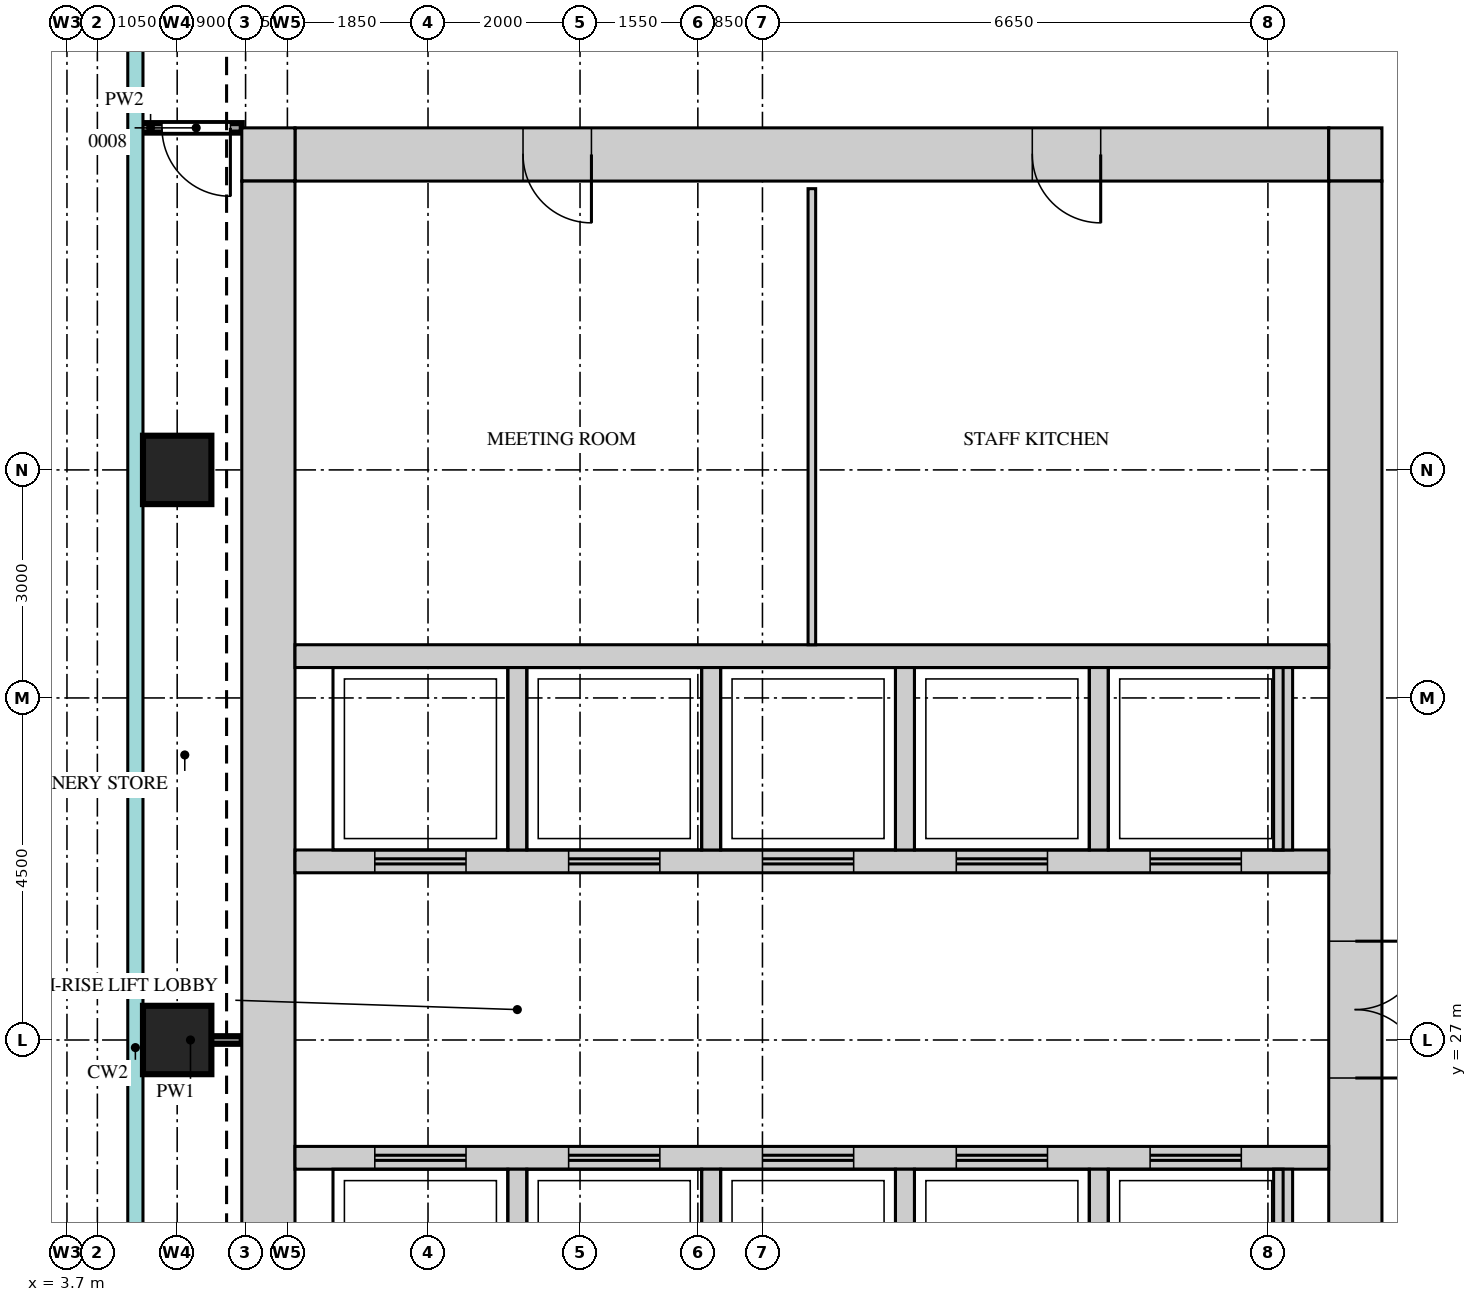
"""IFC4 building model, lengths in metres.
Left out: names, types, materials, properties, quantities, classifications, styles, units other than length and angle.
Written with IfcOpenShell. Run it as: python <this file> out.ifc"""

import sys

from ifc_helpers import new_model, si_unit, direction, frame, frame_2d, origin, origin_2d, place, context, subcontext, project, spatial, rectangle, extrude, source, transform, mapped, element, fill, save


model = new_model("IFC4")
c1 = context("Model", 3, precision=1e-05, world=origin(), true_north=direction((0.0, 1.0)))
c2 = subcontext(c1, "Body", "Model", "MODEL_VIEW")
j1 = project(units=[si_unit("LENGTHUNIT", "METRE"), si_unit("PLANEANGLEUNIT", "RADIAN")], contexts=[c1])
p1 = place(None, origin())
s1 = spatial("IfcSite", under=j1, at=p1, CompositionType="ELEMENT")
p2 = place(p1, origin())
s2 = spatial("IfcBuilding", under=s1, at=p2, CompositionType="ELEMENT")
p3 = place(p2, frame((0.0, 0.0, 230.2)))
s3 = spatial("IfcBuildingStorey", under=s2, at=p3, CompositionType="ELEMENT", Elevation=230.2)
m1 = source(origin(), c2, "Body", "SweptSolid", [
    extrude(rectangle(XDim=13.6, YDim=0.7, at=frame_2d((6.8, 0.0))), origin(), (0.0, 0.0, 1.0), 3.75),
])
p4 = place(p3, frame((6.7, 38.65, 0.0), z_axis=(0.0, 0.0, 1.0), x_axis=(1.0, 0.0, 0.0)))
e1 = element("IfcWall", 1, at=p4, inside=s3, PredefinedType="SHEAR", context=c2, shape_type="MappedRepresentation", body=[
    mapped(m1, transform((0.0, 0.0, 0.0))),
])
m2 = source(origin(), c2, "Body", "SweptSolid", [
    extrude(rectangle(XDim=0.9, YDim=2.1, at=frame_2d((0.45, 1.05))), frame((0.0, 0.36, 0.0), z_axis=(0.0, -1.0, 0.0), x_axis=(1.0, 0.0, 0.0)), (0.0, 0.0, 1.0), 0.72),
])
p5 = place(p4, frame((3.0, 0.0, 0.0)))
e2 = element("IfcOpeningElement", 2, at=p5, cuts=e1, PredefinedType="OPENING", context=c2, shape_type="MappedRepresentation", body=[
    mapped(m2, transform((0.0, 0.0, 0.0))),
])
p6 = place(p4, frame((9.7, 0.0, 0.0)))
e3 = element("IfcOpeningElement", 3, at=p6, cuts=e1, PredefinedType="OPENING", context=c2, shape_type="MappedRepresentation", body=[
    mapped(m2, transform((0.0, 0.0, 0.0))),
])
m3 = source(origin(), c2, "Body", "SweptSolid", [
    extrude(rectangle(XDim=0.7, YDim=0.7, at=frame_2d((0.35, 0.0))), origin(), (0.0, 0.0, 1.0), 3.75),
])
for number, where, z_axis, x_axis in (
    (4, (20.3, 38.65, 0.0), (0.0, 0.0, 1.0), (1.0, 0.0, 0.0)),
    (5, (6.0, 38.65, 0.0), (0.0, 0.0, 1.0), (1.0, 0.0, 0.0)),
):
    element("IfcWall", number, at=place(p3, frame(where, z_axis=z_axis, x_axis=x_axis)), inside=s3, PredefinedType="SHEAR", context=c2, shape_type="MappedRepresentation", body=[
        mapped(m3, transform((0.0, 0.0, 0.0))),
    ])
m4 = source(origin(), c2, "Body", "SweptSolid", [
    extrude(rectangle(XDim=22.6, YDim=0.7, at=frame_2d((11.3, 0.0))), origin(), (0.0, 0.0, 1.0), 3.75),
])
p7 = place(p3, frame((20.65, 15.7, 0.0), z_axis=(0.0, 0.0, 1.0), x_axis=(0.0, 1.0, 0.0)))
e6 = element("IfcWall", 6, at=p7, inside=s3, PredefinedType="SHEAR", context=c2, shape_type="MappedRepresentation", body=[
    mapped(m4, transform((0.0, 0.0, 0.0))),
])
m5 = source(origin(), c2, "Body", "SweptSolid", [
    extrude(rectangle(XDim=1.8, YDim=2.1, at=frame_2d((0.9, 1.05))), frame((0.0, 0.36, 0.0), z_axis=(0.0, -1.0, 0.0), x_axis=(1.0, 0.0, 0.0)), (0.0, 0.0, 1.0), 0.72),
])
p8 = place(p7, frame((10.8, 0.0, 0.0)))
e7 = element("IfcOpeningElement", 7, at=p8, cuts=e6, PredefinedType="OPENING", context=c2, shape_type="MappedRepresentation", body=[
    mapped(m5, transform((0.0, 0.0, 0.0))),
])
p9 = place(p7, frame((0.45, 0.0, 0.0)))
e8 = element("IfcOpeningElement", 8, at=p9, cuts=e6, PredefinedType="OPENING", context=c2, shape_type="MappedRepresentation", body=[
    mapped(m2, transform((0.0, 0.0, 0.0))),
])
p10 = place(p7, frame((2.9, 0.0, 0.0)))
e9 = element("IfcOpeningElement", 9, at=p10, cuts=e6, PredefinedType="OPENING", context=c2, shape_type="MappedRepresentation", body=[
    mapped(m2, transform((0.0, 0.0, 0.0))),
])
p11 = place(p7, frame((5.65, 0.0, 0.0)))
e10 = element("IfcOpeningElement", 10, at=p11, cuts=e6, PredefinedType="OPENING", context=c2, shape_type="MappedRepresentation", body=[
    mapped(m2, transform((0.0, 0.0, 0.0))),
])
p12 = place(p3, frame((6.35, 15.7, 0.0), z_axis=(0.0, 0.0, 1.0), x_axis=(0.0, 1.0, 0.0)))
e11 = element("IfcWall", 11, at=p12, inside=s3, PredefinedType="SHEAR", context=c2, shape_type="MappedRepresentation", body=[
    mapped(m4, transform((0.0, 0.0, 0.0))),
])
m6 = source(origin(), c2, "Body", "SweptSolid", [
    extrude(rectangle(XDim=13.6, YDim=0.3, at=frame_2d((6.8, 0.0))), origin(), (0.0, 0.0, 1.0), 3.75),
])
p13 = place(p3, frame((6.7, 32.05, 0.0), z_axis=(0.0, 0.0, 1.0), x_axis=(1.0, 0.0, 0.0)))
e12 = element("IfcWall", 12, at=p13, inside=s3, PredefinedType="STANDARD", context=c2, shape_type="MappedRepresentation", body=[
    mapped(m6, transform((0.0, 0.0, 0.0))),
])
p14 = place(p3, frame((6.7, 29.35, 0.0), z_axis=(0.0, 0.0, 1.0), x_axis=(1.0, 0.0, 0.0)))
e13 = element("IfcWall", 13, at=p14, inside=s3, PredefinedType="STANDARD", context=c2, shape_type="MappedRepresentation", body=[
    mapped(m6, transform((0.0, 0.0, 0.0))),
])
m7 = source(origin(), c2, "Body", "SweptSolid", [
    extrude(rectangle(XDim=1.2, YDim=2.1, at=frame_2d((0.6, 1.05))), frame((0.0, 0.16, 0.0), z_axis=(0.0, -1.0, 0.0), x_axis=(1.0, 0.0, 0.0)), (0.0, 0.0, 1.0), 0.32),
])
p15 = place(p14, frame((1.05, 0.0, 0.0)))
e14 = element("IfcOpeningElement", 14, at=p15, cuts=e13, PredefinedType="OPENING", context=c2, shape_type="MappedRepresentation", body=[
    mapped(m7, transform((0.0, 0.0, 0.0))),
])
p16 = place(p14, frame((3.6, 0.0, 0.0)))
e15 = element("IfcOpeningElement", 15, at=p16, cuts=e13, PredefinedType="OPENING", context=c2, shape_type="MappedRepresentation", body=[
    mapped(m7, transform((0.0, 0.0, 0.0))),
])
p17 = place(p14, frame((6.15, 0.0, 0.0)))
e16 = element("IfcOpeningElement", 16, at=p17, cuts=e13, PredefinedType="OPENING", context=c2, shape_type="MappedRepresentation", body=[
    mapped(m7, transform((0.0, 0.0, 0.0))),
])
p18 = place(p14, frame((8.7, 0.0, 0.0)))
e17 = element("IfcOpeningElement", 17, at=p18, cuts=e13, PredefinedType="OPENING", context=c2, shape_type="MappedRepresentation", body=[
    mapped(m7, transform((0.0, 0.0, 0.0))),
])
p19 = place(p14, frame((11.25, 0.0, 0.0)))
e18 = element("IfcOpeningElement", 18, at=p19, cuts=e13, PredefinedType="OPENING", context=c2, shape_type="MappedRepresentation", body=[
    mapped(m7, transform((0.0, 0.0, 0.0))),
])
p20 = place(p3, frame((6.7, 25.45, 0.0), z_axis=(0.0, 0.0, 1.0), x_axis=(1.0, 0.0, 0.0)))
e19 = element("IfcWall", 19, at=p20, inside=s3, PredefinedType="STANDARD", context=c2, shape_type="MappedRepresentation", body=[
    mapped(m6, transform((0.0, 0.0, 0.0))),
])
p21 = place(p20, frame((1.05, 0.0, 0.0)))
e20 = element("IfcOpeningElement", 20, at=p21, cuts=e19, PredefinedType="OPENING", context=c2, shape_type="MappedRepresentation", body=[
    mapped(m7, transform((0.0, 0.0, 0.0))),
])
p22 = place(p20, frame((3.6, 0.0, 0.0)))
e21 = element("IfcOpeningElement", 21, at=p22, cuts=e19, PredefinedType="OPENING", context=c2, shape_type="MappedRepresentation", body=[
    mapped(m7, transform((0.0, 0.0, 0.0))),
])
p23 = place(p20, frame((6.15, 0.0, 0.0)))
e22 = element("IfcOpeningElement", 22, at=p23, cuts=e19, PredefinedType="OPENING", context=c2, shape_type="MappedRepresentation", body=[
    mapped(m7, transform((0.0, 0.0, 0.0))),
])
p24 = place(p20, frame((8.7, 0.0, 0.0)))
e23 = element("IfcOpeningElement", 23, at=p24, cuts=e19, PredefinedType="OPENING", context=c2, shape_type="MappedRepresentation", body=[
    mapped(m7, transform((0.0, 0.0, 0.0))),
])
p25 = place(p20, frame((11.25, 0.0, 0.0)))
e24 = element("IfcOpeningElement", 24, at=p25, cuts=e19, PredefinedType="OPENING", context=c2, shape_type="MappedRepresentation", body=[
    mapped(m7, transform((0.0, 0.0, 0.0))),
])
m8 = source(origin(), c2, "Body", "SweptSolid", [
    extrude(rectangle(XDim=2.4, YDim=0.25, at=frame_2d((1.2, 0.0))), origin(), (0.0, 0.0, 1.0), 3.75),
])
for number, where, z_axis, x_axis in (
    (25, (17.275, 29.5, 0.0), (0.0, 0.0, 1.0), (0.0, 1.0, 0.0)),
    (26, (19.7, 29.5, 0.0), (0.0, 0.0, 1.0), (0.0, 1.0, 0.0)),
    (27, (9.625, 29.5, 0.0), (0.0, 0.0, 1.0), (0.0, 1.0, 0.0)),
    (28, (12.175, 29.5, 0.0), (0.0, 0.0, 1.0), (0.0, 1.0, 0.0)),
    (29, (14.725, 29.5, 0.0), (0.0, 0.0, 1.0), (0.0, 1.0, 0.0)),
):
    element("IfcWall", number, at=place(p3, frame(where, z_axis=z_axis, x_axis=x_axis)), inside=s3, PredefinedType="STANDARD", context=c2, shape_type="MappedRepresentation", body=[
        mapped(m8, transform((0.0, 0.0, 0.0))),
    ])
m9 = source(origin(), c2, "Body", "SweptSolid", [
    extrude(rectangle(XDim=2.4, YDim=0.25, at=frame_2d((1.2, 0.0))), origin(), (0.0, 0.0, 1.0), 3.75),
])
for number, where, z_axis, x_axis in (
    (30, (17.275, 22.9, 0.0), (0.0, 0.0, 1.0), (0.0, 1.0, 0.0)),
    (31, (19.7, 22.9, 0.0), (0.0, 0.0, 1.0), (0.0, 1.0, 0.0)),
    (32, (9.625, 22.9, 0.0), (0.0, 0.0, 1.0), (0.0, 1.0, 0.0)),
    (33, (12.175, 22.9, 0.0), (0.0, 0.0, 1.0), (0.0, 1.0, 0.0)),
    (34, (14.725, 22.9, 0.0), (0.0, 0.0, 1.0), (0.0, 1.0, 0.0)),
):
    element("IfcWall", number, at=place(p3, frame(where, z_axis=z_axis, x_axis=x_axis)), inside=s3, PredefinedType="STANDARD", context=c2, shape_type="MappedRepresentation", body=[
        mapped(m9, transform((0.0, 0.0, 0.0))),
    ])
m10 = source(origin(), c2, "Body", "SweptSolid", [
    extrude(rectangle(XDim=0.9, YDim=0.9, at=origin_2d()), origin(), (0.0, 0.0, 1.0), 3.75),
])
for number, where, z_axis, x_axis in (
    (35, (5.15, 27.0, 0.0), (0.0, 0.0, 1.0), (1.0, 0.0, 0.0)),
    (36, (5.15, 34.5, 0.0), (0.0, 0.0, 1.0), (1.0, 0.0, 0.0)),
):
    element("IfcColumn", number, at=place(p3, frame(where, z_axis=z_axis, x_axis=x_axis)), inside=s3, PredefinedType="COLUMN", context=c2, shape_type="MappedRepresentation", body=[
        mapped(m10, transform((0.0, 0.0, 0.0))),
    ])
m11 = source(origin(), c2, "Body", "SweptSolid", [
    extrude(rectangle(XDim=1.35, YDim=0.1, at=frame_2d((0.675, 0.0))), origin(), (0.0, 0.0, 1.0), 3.8),
])
p26 = place(p3, frame((4.65, 27.0, 0.0), z_axis=(0.0, 0.0, 1.0), x_axis=(1.0, 0.0, 0.0)))
e37 = element("IfcWall", 37, at=p26, inside=s3, PredefinedType="PARTITIONING", context=c2, shape_type="MappedRepresentation", body=[
    mapped(m11, transform((0.0, 0.0, 0.0))),
])
m12 = source(origin(), c2, "Body", "SweptSolid", [
    extrude(rectangle(XDim=6.0, YDim=0.1, at=frame_2d((3.0, 0.0))), origin(), (0.0, 0.0, 1.0), 3.8),
])
p27 = place(p3, frame((13.5, 32.2, 0.0), z_axis=(0.0, 0.0, 1.0), x_axis=(0.0, 1.0, 0.0)))
e38 = element("IfcWall", 38, at=p27, inside=s3, PredefinedType="PARTITIONING", context=c2, shape_type="MappedRepresentation", body=[
    mapped(m12, transform((0.0, 0.0, 0.0))),
])
m13 = source(origin(), c2, "Body", "SweptSolid", [
    extrude(rectangle(XDim=1.35, YDim=0.125, at=frame_2d((0.675, 0.0))), origin(), (0.0, 0.0, 1.0), 3.8),
])
p28 = place(p3, frame((4.65, 39.0, 0.0), z_axis=(0.0, 0.0, 1.0), x_axis=(1.0, 0.0, 0.0)))
e39 = element("IfcWall", 39, at=p28, inside=s3, PredefinedType="PARTITIONING", context=c2, shape_type="MappedRepresentation", body=[
    mapped(m13, transform((0.0, 0.0, 0.0))),
])
m14 = source(origin(), c2, "Body", "SweptSolid", [
    extrude(rectangle(XDim=0.9, YDim=2.1, at=frame_2d((0.45, 1.05))), frame((0.0, 0.073, 0.0), z_axis=(0.0, -1.0, 0.0), x_axis=(1.0, 0.0, 0.0)), (0.0, 0.0, 1.0), 0.145),
])
p29 = place(p28, frame((0.3, 0.0, 0.0)))
e40 = element("IfcOpeningElement", 40, at=p29, cuts=e39, PredefinedType="OPENING", context=c2, shape_type="MappedRepresentation", body=[
    mapped(m14, transform((0.0, 0.0, 0.0))),
])
m15 = source(origin(), c2, "Body", "SweptSolid", [
    extrude(rectangle(XDim=1.8, YDim=2.1, at=frame_2d((0.9, 1.05))), frame((0.0, 0.3, 0.0), z_axis=(0.0, -1.0, 0.0), x_axis=(1.0, 0.0, 0.0)), (0.0, 0.0, 1.0), 0.6),
])
p30 = place(p8, origin())
e41 = element("IfcDoor", 41, at=p30, inside=s3, OperationType="DOUBLE_DOOR_SINGLE_SWING", PredefinedType="DOOR", context=c2, shape_type="MappedRepresentation", body=[
    mapped(m15, transform((0.0, 0.0, 0.0))),
])
fill(e7, e41)
m16 = source(origin(), c2, "Body", "SweptSolid", [
    extrude(rectangle(XDim=0.9, YDim=2.1, at=frame_2d((0.45, 1.05))), frame((0.0, 0.3, 0.0), z_axis=(0.0, -1.0, 0.0), x_axis=(1.0, 0.0, 0.0)), (0.0, 0.0, 1.0), 0.6),
])
p31 = place(p5, origin())
e42 = element("IfcDoor", 42, at=p31, inside=s3, OperationType="SINGLE_SWING_RIGHT", PredefinedType="DOOR", context=c2, shape_type="MappedRepresentation", body=[
    mapped(m16, transform((0.0, 0.0, 0.0))),
])
fill(e2, e42)
p32 = place(p6, origin())
e43 = element("IfcDoor", 43, at=p32, inside=s3, OperationType="SINGLE_SWING_RIGHT", PredefinedType="DOOR", context=c2, shape_type="MappedRepresentation", body=[
    mapped(m16, transform((0.0, 0.0, 0.0))),
])
fill(e3, e43)
m17 = source(origin(), c2, "Body", "SweptSolid", [
    extrude(rectangle(XDim=0.9, YDim=2.1, at=frame_2d((0.45, 1.05))), frame((0.0, 0.025, 0.0), z_axis=(0.0, -1.0, 0.0), x_axis=(1.0, 0.0, 0.0)), (0.0, 0.0, 1.0), 0.05),
])
p33 = place(p29, origin())
e44 = element("IfcDoor", 44, at=p33, inside=s3, OperationType="SINGLE_SWING_RIGHT", PredefinedType="DOOR", context=c2, shape_type="MappedRepresentation", body=[
    mapped(m17, transform((0.0, 0.0, 0.0))),
])
fill(e40, e44)
m18 = source(origin(), c2, "Body", "SweptSolid", [
    extrude(rectangle(XDim=1.2, YDim=2.1, at=frame_2d((0.6, 1.05))), frame((0.0, 0.025, 0.0), z_axis=(0.0, -1.0, 0.0), x_axis=(1.0, 0.0, 0.0)), (0.0, 0.0, 1.0), 0.05),
])
p34 = place(p21, origin())
e45 = element("IfcDoor", 45, at=p34, inside=s3, OperationType="DOUBLE_DOOR_SLIDING", PredefinedType="DOOR", context=c2, shape_type="MappedRepresentation", body=[
    mapped(m18, transform((0.0, 0.0, 0.0))),
])
fill(e20, e45)
p35 = place(p22, origin())
e46 = element("IfcDoor", 46, at=p35, inside=s3, OperationType="DOUBLE_DOOR_SLIDING", PredefinedType="DOOR", context=c2, shape_type="MappedRepresentation", body=[
    mapped(m18, transform((0.0, 0.0, 0.0))),
])
fill(e21, e46)
p36 = place(p23, origin())
e47 = element("IfcDoor", 47, at=p36, inside=s3, OperationType="DOUBLE_DOOR_SLIDING", PredefinedType="DOOR", context=c2, shape_type="MappedRepresentation", body=[
    mapped(m18, transform((0.0, 0.0, 0.0))),
])
fill(e22, e47)
p37 = place(p24, origin())
e48 = element("IfcDoor", 48, at=p37, inside=s3, OperationType="DOUBLE_DOOR_SLIDING", PredefinedType="DOOR", context=c2, shape_type="MappedRepresentation", body=[
    mapped(m18, transform((0.0, 0.0, 0.0))),
])
fill(e23, e48)
p38 = place(p25, origin())
e49 = element("IfcDoor", 49, at=p38, inside=s3, OperationType="DOUBLE_DOOR_SLIDING", PredefinedType="DOOR", context=c2, shape_type="MappedRepresentation", body=[
    mapped(m18, transform((0.0, 0.0, 0.0))),
])
fill(e24, e49)
p39 = place(p15, origin())
e50 = element("IfcDoor", 50, at=p39, inside=s3, OperationType="DOUBLE_DOOR_SLIDING", PredefinedType="DOOR", context=c2, shape_type="MappedRepresentation", body=[
    mapped(m18, transform((0.0, 0.0, 0.0))),
])
fill(e14, e50)
p40 = place(p16, origin())
e51 = element("IfcDoor", 51, at=p40, inside=s3, OperationType="DOUBLE_DOOR_SLIDING", PredefinedType="DOOR", context=c2, shape_type="MappedRepresentation", body=[
    mapped(m18, transform((0.0, 0.0, 0.0))),
])
fill(e15, e51)
p41 = place(p17, origin())
e52 = element("IfcDoor", 52, at=p41, inside=s3, OperationType="DOUBLE_DOOR_SLIDING", PredefinedType="DOOR", context=c2, shape_type="MappedRepresentation", body=[
    mapped(m18, transform((0.0, 0.0, 0.0))),
])
fill(e16, e52)
p42 = place(p18, origin())
e53 = element("IfcDoor", 53, at=p42, inside=s3, OperationType="DOUBLE_DOOR_SLIDING", PredefinedType="DOOR", context=c2, shape_type="MappedRepresentation", body=[
    mapped(m18, transform((0.0, 0.0, 0.0))),
])
fill(e17, e53)
p43 = place(p19, origin())
e54 = element("IfcDoor", 54, at=p43, inside=s3, OperationType="DOUBLE_DOOR_SLIDING", PredefinedType="DOOR", context=c2, shape_type="MappedRepresentation", body=[
    mapped(m18, transform((0.0, 0.0, 0.0))),
])
fill(e18, e54)
save(model, sys.argv[1])
